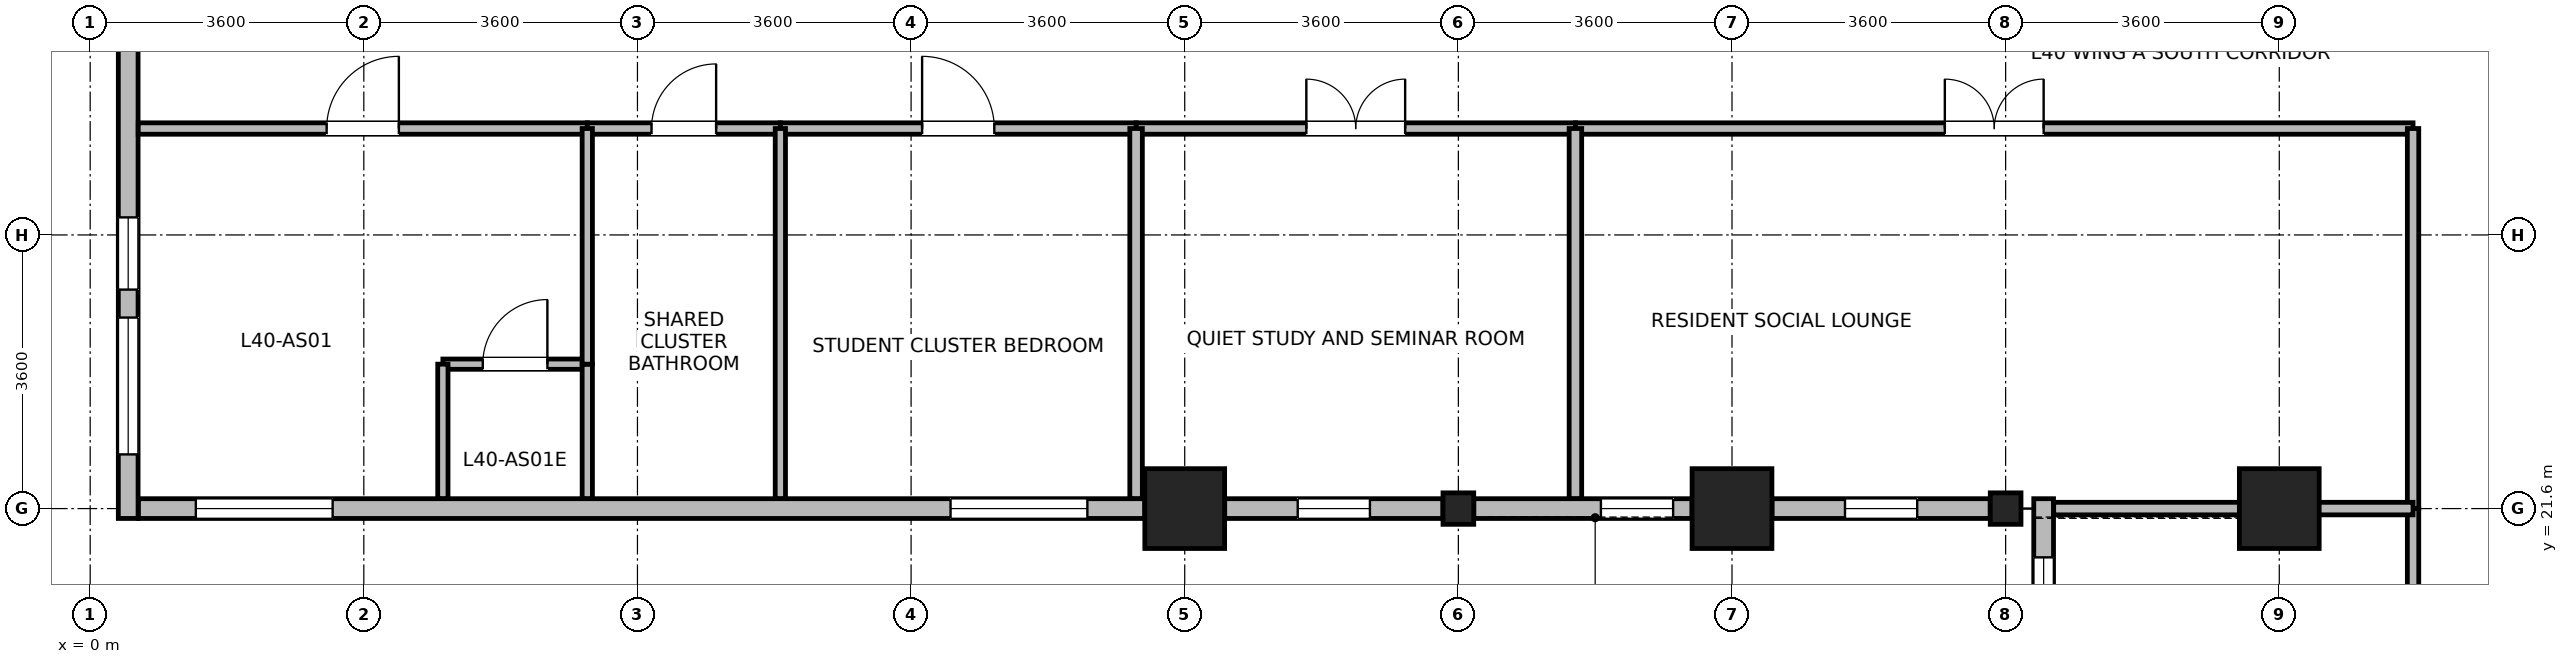
"""IFC4 building model, lengths in metres.
Left out: names, types, materials, properties, quantities, classifications, styles, units other than length and angle.
Written with IfcOpenShell. Run it as: python <this file> out.ifc"""

import sys

from ifc_helpers import new_model, si_unit, direction, frame, frame_2d, origin, origin_2d, place, context, subcontext, project, spatial, rectangle, i_section, extrude, source, transform, mapped, element, fill, save


model = new_model("IFC4")
c1 = context("Model", 3, precision=1e-05, world=origin(), true_north=direction((0.0, 1.0)))
c2 = subcontext(c1, "Body", "Model", "MODEL_VIEW")
j1 = project(units=[si_unit("LENGTHUNIT", "METRE"), si_unit("PLANEANGLEUNIT", "RADIAN")], contexts=[c1])
p1 = place(None, origin())
s1 = spatial("IfcSite", under=j1, at=p1, CompositionType="ELEMENT")
p2 = place(p1, origin())
s2 = spatial("IfcBuilding", under=s1, at=p2, CompositionType="ELEMENT")
p3 = place(p2, frame((0.0, 0.0, 158.7)))
s3 = spatial("IfcBuildingStorey", under=s2, at=p3, CompositionType="ELEMENT", Elevation=158.7)
m1 = source(origin(), c2, "Body", "SweptSolid", [
    extrude(rectangle(XDim=1.05, YDim=1.05, at=origin_2d()), origin(), (0.0, 0.0, 1.0), 3.7),
])
for number, where, z_axis, x_axis in (
    (1, (14.4, 21.6, 0.0), (0.0, 0.0, 1.0), (1.0, 0.0, 0.0)),
    (2, (21.6, 21.6, 0.0), (0.0, 0.0, 1.0), (1.0, 0.0, 0.0)),
    (3, (28.8, 21.6, 0.0), (0.0, 0.0, 1.0), (1.0, 0.0, 0.0)),
):
    element("IfcColumn", number, at=place(p3, frame(where, z_axis=z_axis, x_axis=x_axis)), inside=s3, PredefinedType="COLUMN", context=c2, shape_type="MappedRepresentation", body=[
        mapped(m1, transform((0.0, 0.0, 0.0), x_axis=(1.0, 0.0, 0.0), y_axis=(0.0, 1.0, 0.0), z_axis=(0.0, 0.0, 1.0), scale=1.0)),
    ])
m2 = source(origin(), c2, "Body", "SweptSolid", [
    extrude(i_section(OverallWidth=0.404, OverallDepth=0.414, WebThickness=0.021, FlangeThickness=0.028, FilletRadius=0.015, at=origin_2d()), origin(), (0.0, 0.0, 1.0), 3.7),
])
for number, where, z_axis, x_axis in (
    (4, (18.0, 21.6, 0.0), (0.0, 0.0, 1.0), (1.0, 0.0, 0.0)),
    (5, (25.2, 21.6, 0.0), (0.0, 0.0, 1.0), (1.0, 0.0, 0.0)),
):
    element("IfcColumn", number, at=place(p3, frame(where, z_axis=z_axis, x_axis=x_axis)), inside=s3, PredefinedType="COLUMN", context=c2, shape_type="MappedRepresentation", body=[
        mapped(m2, transform((0.0, 0.0, 0.0), x_axis=(1.0, 0.0, 0.0), y_axis=(0.0, 1.0, 0.0), z_axis=(0.0, 0.0, 1.0), scale=1.0)),
    ])
p4 = place(p3, frame((0.5, 21.47, 0.0), z_axis=(0.0, 0.0, 1.0), x_axis=(0.0, 1.0, 0.0)))
e6 = element("IfcWall", 6, at=p4, inside=s3, PredefinedType="STANDARD", context=c2, shape_type="SweptSolid", body=[
    extrude(rectangle(XDim=6.972, YDim=0.26, at=frame_2d((3.486, 0.0))), origin(), (0.0, 0.0, 1.0), 3.44),
])
p5 = place(p4, frame((0.843, 0.0, 0.85)))
e7 = element("IfcOpeningElement", 7, at=p5, cuts=e6, PredefinedType="OPENING", context=c2, shape_type="SweptSolid", body=[
    extrude(rectangle(XDim=1.8, YDim=1.85, at=frame_2d((0.9, 0.925))), frame((0.0, 0.14, 0.0), z_axis=(0.0, -1.0, 0.0), x_axis=(1.0, 0.0, 0.0)), (0.0, 0.0, 1.0), 0.28),
])
p6 = place(p4, frame((3.011, 0.0, 0.85)))
e8 = element("IfcOpeningElement", 8, at=p6, cuts=e6, PredefinedType="OPENING", context=c2, shape_type="SweptSolid", body=[
    extrude(rectangle(XDim=0.95, YDim=1.75, at=frame_2d((0.475, 0.875))), frame((0.0, 0.14, 0.0), z_axis=(0.0, -1.0, 0.0), x_axis=(1.0, 0.0, 0.0)), (0.0, 0.0, 1.0), 0.28),
])
p7 = place(p3, frame((13.874, 21.6, 0.0), z_axis=(0.0, 0.0, 1.0), x_axis=(-1.0, 0.0, 0.0)))
e9 = element("IfcWall", 9, at=p7, inside=s3, PredefinedType="STANDARD", context=c2, shape_type="SweptSolid", body=[
    extrude(rectangle(XDim=13.239, YDim=0.26, at=frame_2d((6.62, 0.0))), origin(), (0.0, 0.0, 1.0), 3.44),
])
p8 = place(p7, frame((0.755, 0.0, 0.85)))
e10 = element("IfcOpeningElement", 10, at=p8, cuts=e9, PredefinedType="OPENING", context=c2, shape_type="SweptSolid", body=[
    extrude(rectangle(XDim=1.8, YDim=1.85, at=frame_2d((0.9, 0.925))), frame((0.0, 0.14, 0.0), z_axis=(0.0, -1.0, 0.0), x_axis=(1.0, 0.0, 0.0)), (0.0, 0.0, 1.0), 0.28),
])
p9 = place(p7, frame((10.684, 0.0, 0.85)))
e11 = element("IfcOpeningElement", 11, at=p9, cuts=e9, PredefinedType="OPENING", context=c2, shape_type="SweptSolid", body=[
    extrude(rectangle(XDim=1.8, YDim=1.85, at=frame_2d((0.9, 0.925))), frame((0.0, 0.14, 0.0), z_axis=(0.0, -1.0, 0.0), x_axis=(1.0, 0.0, 0.0)), (0.0, 0.0, 1.0), 0.28),
])
p10 = place(p3, frame((17.797, 21.6, 0.0), z_axis=(0.0, 0.0, 1.0), x_axis=(-1.0, 0.0, 0.0)))
e12 = element("IfcWall", 12, at=p10, inside=s3, PredefinedType="STANDARD", context=c2, shape_type="SweptSolid", body=[
    extrude(rectangle(XDim=2.871, YDim=0.26, at=frame_2d((1.436, 0.0))), origin(), (0.0, 0.0, 1.0), 2.99),
])
p11 = place(p10, frame((0.96, 0.0, 0.85)))
e13 = element("IfcOpeningElement", 13, at=p11, cuts=e12, PredefinedType="OPENING", context=c2, shape_type="SweptSolid", body=[
    extrude(rectangle(XDim=0.95, YDim=1.75, at=frame_2d((0.475, 0.875))), frame((0.0, 0.14, 0.0), z_axis=(0.0, -1.0, 0.0), x_axis=(1.0, 0.0, 0.0)), (0.0, 0.0, 1.0), 0.28),
])
p12 = place(p3, frame((21.074, 21.6, 0.0), z_axis=(0.0, 0.0, 1.0), x_axis=(-1.0, 0.0, 0.0)))
e14 = element("IfcWall", 14, at=p12, inside=s3, PredefinedType="STANDARD", context=c2, shape_type="SweptSolid", body=[
    extrude(rectangle(XDim=2.871, YDim=0.26, at=frame_2d((1.436, 0.0))), origin(), (0.0, 0.0, 1.0), 2.99),
])
p13 = place(p12, frame((0.249, 0.0, 0.85)))
e15 = element("IfcOpeningElement", 15, at=p13, cuts=e14, PredefinedType="OPENING", context=c2, shape_type="SweptSolid", body=[
    extrude(rectangle(XDim=0.95, YDim=1.75, at=frame_2d((0.475, 0.875))), frame((0.0, 0.14, 0.0), z_axis=(0.0, -1.0, 0.0), x_axis=(1.0, 0.0, 0.0)), (0.0, 0.0, 1.0), 0.28),
])
p14 = place(p3, frame((24.997, 21.6, 0.0), z_axis=(0.0, 0.0, 1.0), x_axis=(-1.0, 0.0, 0.0)))
e16 = element("IfcWall", 16, at=p14, inside=s3, PredefinedType="STANDARD", context=c2, shape_type="SweptSolid", body=[
    extrude(rectangle(XDim=2.871, YDim=0.26, at=frame_2d((1.436, 0.0))), origin(), (0.0, 0.0, 1.0), 2.99),
])
p15 = place(p14, frame((0.96, 0.0, 0.85)))
e17 = element("IfcOpeningElement", 17, at=p15, cuts=e16, PredefinedType="OPENING", context=c2, shape_type="SweptSolid", body=[
    extrude(rectangle(XDim=0.95, YDim=1.75, at=frame_2d((0.475, 0.875))), frame((0.0, 0.14, 0.0), z_axis=(0.0, -1.0, 0.0), x_axis=(1.0, 0.0, 0.0)), (0.0, 0.0, 1.0), 0.28),
])
p16 = place(p3, frame((25.7, 1.67, 0.0), z_axis=(0.0, 0.0, 1.0), x_axis=(0.0, 1.0, 0.0)))
e18 = element("IfcWall", 18, at=p16, inside=s3, PredefinedType="STANDARD", context=c2, shape_type="SweptSolid", body=[
    extrude(rectangle(XDim=20.06, YDim=0.26, at=frame_2d((10.03, 0.0))), origin(), (0.0, 0.0, 1.0), 3.44),
])
p17 = place(p16, frame((0.772, 0.0, 0.85)))
e19 = element("IfcOpeningElement", 19, at=p17, cuts=e18, PredefinedType="OPENING", context=c2, shape_type="SweptSolid", body=[
    extrude(rectangle(XDim=1.8, YDim=1.85, at=frame_2d((0.9, 0.925))), frame((0.0, 0.14, 0.0), z_axis=(0.0, -1.0, 0.0), x_axis=(1.0, 0.0, 0.0)), (0.0, 0.0, 1.0), 0.28),
])
p18 = place(p16, frame((7.458, 0.0, 0.85)))
e20 = element("IfcOpeningElement", 20, at=p18, cuts=e18, PredefinedType="OPENING", context=c2, shape_type="SweptSolid", body=[
    extrude(rectangle(XDim=1.8, YDim=1.85, at=frame_2d((0.9, 0.925))), frame((0.0, 0.14, 0.0), z_axis=(0.0, -1.0, 0.0), x_axis=(1.0, 0.0, 0.0)), (0.0, 0.0, 1.0), 0.28),
])
p19 = place(p16, frame((14.145, 0.0, 0.85)))
e21 = element("IfcOpeningElement", 21, at=p19, cuts=e18, PredefinedType="OPENING", context=c2, shape_type="SweptSolid", body=[
    extrude(rectangle(XDim=1.8, YDim=1.85, at=frame_2d((0.9, 0.925))), frame((0.0, 0.14, 0.0), z_axis=(0.0, -1.0, 0.0), x_axis=(1.0, 0.0, 0.0)), (0.0, 0.0, 1.0), 0.28),
])
p20 = place(p16, frame((17.488, 0.0, 0.85)))
e22 = element("IfcOpeningElement", 22, at=p20, cuts=e18, PredefinedType="OPENING", context=c2, shape_type="SweptSolid", body=[
    extrude(rectangle(XDim=1.8, YDim=1.85, at=frame_2d((0.9, 0.925))), frame((0.0, 0.14, 0.0), z_axis=(0.0, -1.0, 0.0), x_axis=(1.0, 0.0, 0.0)), (0.0, 0.0, 1.0), 0.28),
])
p21 = place(p3, frame((4.64, 23.5, 0.0), z_axis=(0.0, 0.0, 1.0), x_axis=(1.0, 0.0, 0.0)))
e23 = element("IfcWall", 23, at=p21, inside=s3, PredefinedType="PARTITIONING", context=c2, shape_type="SweptSolid", body=[
    extrude(rectangle(XDim=1.9, YDim=0.135, at=frame_2d((0.95, 0.0))), origin(), (0.0, 0.0, 1.0), 3.44),
])
p22 = place(p21, frame((0.525, 0.0, 0.0)))
e24 = element("IfcOpeningElement", 24, at=p22, cuts=e23, PredefinedType="OPENING", context=c2, shape_type="SweptSolid", body=[
    extrude(rectangle(XDim=0.85, YDim=2.04, at=frame_2d((0.425, 1.02))), frame((0.0, 0.078, 0.0), z_axis=(0.0, -1.0, 0.0), x_axis=(1.0, 0.0, 0.0)), (0.0, 0.0, 1.0), 0.155),
])
for number, where, z_axis, x_axis in (
    (25, (4.64, 21.732, 0.0), (0.0, 0.0, 1.0), (0.0, 1.0, 0.0)),
    (26, (6.54, 21.732, 0.0), (0.0, 0.0, 1.0), (0.0, 1.0, 0.0)),
):
    element("IfcWall", number, at=place(p3, frame(where, z_axis=z_axis, x_axis=x_axis)), inside=s3, PredefinedType="PARTITIONING", context=c2, shape_type="SweptSolid", body=[
        extrude(rectangle(XDim=1.768, YDim=0.135, at=frame_2d((0.884, 0.0))), origin(), (0.0, 0.0, 1.0), 3.44),
    ])
p23 = place(p3, frame((19.54, 26.6, 0.0), z_axis=(0.0, 0.0, 1.0), x_axis=(1.0, 0.0, 0.0)))
e27 = element("IfcWall", 27, at=p23, inside=s3, PredefinedType="PARTITIONING", context=c2, shape_type="SweptSolid", body=[
    extrude(rectangle(XDim=11.02, YDim=0.15, at=frame_2d((5.51, 0.0))), origin(), (0.0, 0.0, 1.0), 3.44),
])
p24 = place(p23, frame((4.86, 0.0, 0.0)))
e28 = element("IfcOpeningElement", 28, at=p24, cuts=e27, PredefinedType="OPENING", context=c2, shape_type="SweptSolid", body=[
    extrude(rectangle(XDim=1.3, YDim=2.12, at=frame_2d((0.65, 1.06))), frame((0.0, 0.085, 0.0), z_axis=(0.0, -1.0, 0.0), x_axis=(1.0, 0.0, 0.0)), (0.0, 0.0, 1.0), 0.17),
])
p25 = place(p3, frame((30.56, 14.5, 0.0), z_axis=(0.0, 0.0, 1.0), x_axis=(0.0, 1.0, 0.0)))
e29 = element("IfcWall", 29, at=p25, inside=s3, PredefinedType="PARTITIONING", context=c2, shape_type="SweptSolid", body=[
    extrude(rectangle(XDim=7.1, YDim=0.15, at=frame_2d((3.55, 0.0))), origin(), (0.0, 0.0, 1.0), 3.44),
])
p26 = place(p25, frame((2.9, 0.0, 0.0)))
e30 = element("IfcOpeningElement", 30, at=p26, cuts=e29, PredefinedType="OPENING", context=c2, shape_type="SweptSolid", body=[
    extrude(rectangle(XDim=1.3, YDim=2.12, at=frame_2d((0.65, 1.06))), frame((0.0, 0.085, 0.0), z_axis=(0.0, -1.0, 0.0), x_axis=(1.0, 0.0, 0.0)), (0.0, 0.0, 1.0), 0.17),
])
p27 = place(p3, frame((0.632, 26.6, 0.0), z_axis=(0.0, 0.0, 1.0), x_axis=(1.0, 0.0, 0.0)))
e31 = element("IfcWall", 31, at=p27, inside=s3, PredefinedType="PARTITIONING", context=c2, shape_type="SweptSolid", body=[
    extrude(rectangle(XDim=5.908, YDim=0.15, at=frame_2d((2.954, 0.0))), origin(), (0.0, 0.0, 1.0), 3.44),
])
p28 = place(p27, frame((2.479, 0.0, 0.0)))
e32 = element("IfcOpeningElement", 32, at=p28, cuts=e31, PredefinedType="OPENING", context=c2, shape_type="SweptSolid", body=[
    extrude(rectangle(XDim=0.95, YDim=2.1, at=frame_2d((0.475, 1.05))), frame((0.0, 0.085, 0.0), z_axis=(0.0, -1.0, 0.0), x_axis=(1.0, 0.0, 0.0)), (0.0, 0.0, 1.0), 0.17),
])
p29 = place(p3, frame((13.76, 26.6, 0.0), z_axis=(0.0, 0.0, 1.0), x_axis=(1.0, 0.0, 0.0)))
e33 = element("IfcWall", 33, at=p29, inside=s3, PredefinedType="PARTITIONING", context=c2, shape_type="SweptSolid", body=[
    extrude(rectangle(XDim=5.78, YDim=0.15, at=frame_2d((2.89, 0.0))), origin(), (0.0, 0.0, 1.0), 3.44),
])
p30 = place(p29, frame((2.24, 0.0, 0.0)))
e34 = element("IfcOpeningElement", 34, at=p30, cuts=e33, PredefinedType="OPENING", context=c2, shape_type="SweptSolid", body=[
    extrude(rectangle(XDim=1.3, YDim=2.12, at=frame_2d((0.65, 1.06))), frame((0.0, 0.085, 0.0), z_axis=(0.0, -1.0, 0.0), x_axis=(1.0, 0.0, 0.0)), (0.0, 0.0, 1.0), 0.17),
])
p31 = place(p3, frame((30.56, 21.6, 0.0), z_axis=(0.0, 0.0, 1.0), x_axis=(0.0, 1.0, 0.0)))
e35 = element("IfcWall", 35, at=p31, inside=s3, PredefinedType="PARTITIONING", context=c2, shape_type="SweptSolid", body=[
    extrude(rectangle(XDim=5.0, YDim=0.15, at=frame_2d((2.5, 0.0))), origin(), (0.0, 0.0, 1.0), 3.44),
])
p32 = place(p3, frame((9.08, 26.6, 0.0), z_axis=(0.0, 0.0, 1.0), x_axis=(1.0, 0.0, 0.0)))
e36 = element("IfcWall", 36, at=p32, inside=s3, PredefinedType="PARTITIONING", context=c2, shape_type="SweptSolid", body=[
    extrude(rectangle(XDim=4.68, YDim=0.15, at=frame_2d((2.34, 0.0))), origin(), (0.0, 0.0, 1.0), 3.44),
])
p33 = place(p32, frame((1.865, 0.0, 0.0)))
e37 = element("IfcOpeningElement", 37, at=p33, cuts=e36, PredefinedType="OPENING", context=c2, shape_type="SweptSolid", body=[
    extrude(rectangle(XDim=0.95, YDim=2.1, at=frame_2d((0.475, 1.05))), frame((0.0, 0.085, 0.0), z_axis=(0.0, -1.0, 0.0), x_axis=(1.0, 0.0, 0.0)), (0.0, 0.0, 1.0), 0.17),
])
p34 = place(p3, frame((6.54, 26.6, 0.0), z_axis=(0.0, 0.0, 1.0), x_axis=(1.0, 0.0, 0.0)))
e38 = element("IfcWall", 38, at=p34, inside=s3, PredefinedType="PARTITIONING", context=c2, shape_type="SweptSolid", body=[
    extrude(rectangle(XDim=2.54, YDim=0.15, at=frame_2d((1.27, 0.0))), origin(), (0.0, 0.0, 1.0), 3.44),
])
p35 = place(p34, frame((0.845, 0.0, 0.0)))
e39 = element("IfcOpeningElement", 39, at=p35, cuts=e38, PredefinedType="OPENING", context=c2, shape_type="SweptSolid", body=[
    extrude(rectangle(XDim=0.85, YDim=2.04, at=frame_2d((0.425, 1.02))), frame((0.0, 0.085, 0.0), z_axis=(0.0, -1.0, 0.0), x_axis=(1.0, 0.0, 0.0)), (0.0, 0.0, 1.0), 0.17),
])
p36 = place(p3, frame((9.08, 21.732, 0.0), z_axis=(0.0, 0.0, 1.0), x_axis=(0.0, 1.0, 0.0)))
e40 = element("IfcWall", 40, at=p36, inside=s3, PredefinedType="PARTITIONING", context=c2, shape_type="SweptSolid", body=[
    extrude(rectangle(XDim=4.868, YDim=0.135, at=frame_2d((2.434, 0.0))), origin(), (0.0, 0.0, 1.0), 3.44),
])
for number, where, z_axis, x_axis in (
    (41, (13.76, 21.732, 0.0), (0.0, 0.0, 1.0), (0.0, 1.0, 0.0)),
    (42, (19.54, 21.732, 0.0), (0.0, 0.0, 1.0), (0.0, 1.0, 0.0)),
):
    element("IfcWall", number, at=place(p3, frame(where, z_axis=z_axis, x_axis=x_axis)), inside=s3, PredefinedType="PARTITIONING", context=c2, shape_type="SweptSolid", body=[
        extrude(rectangle(XDim=4.868, YDim=0.165, at=frame_2d((2.434, 0.0))), origin(), (0.0, 0.0, 1.0), 3.44),
    ])
p37 = place(p3, frame((25.832, 21.6, 0.0), z_axis=(0.0, 0.0, 1.0), x_axis=(1.0, 0.0, 0.0)))
e43 = element("IfcWall", 43, at=p37, inside=s3, PredefinedType="PARTITIONING", context=c2, shape_type="SweptSolid", body=[
    extrude(rectangle(XDim=4.728, YDim=0.165, at=frame_2d((2.364, 0.0))), origin(), (0.0, 0.0, 1.0), 2.99),
])
p38 = place(p3, frame((6.54, 23.5, 0.0), z_axis=(0.0, 0.0, 1.0), x_axis=(0.0, 1.0, 0.0)))
e44 = element("IfcWall", 44, at=p38, inside=s3, PredefinedType="PARTITIONING", context=c2, shape_type="SweptSolid", body=[
    extrude(rectangle(XDim=3.1, YDim=0.135, at=frame_2d((1.55, 0.0))), origin(), (0.0, 0.0, 1.0), 3.44),
])
p39 = place(p5, origin())
e45 = element("IfcWindow", 45, at=p39, inside=s3, PartitioningType="SINGLE_PANEL", PredefinedType="WINDOW", context=c2, shape_type="SweptSolid", body=[
    extrude(rectangle(XDim=1.8, YDim=1.85, at=frame_2d((0.9, 0.925))), frame((0.0, 0.03, 0.0), z_axis=(0.0, -1.0, 0.0), x_axis=(1.0, 0.0, 0.0)), (0.0, 0.0, 1.0), 0.06),
])
fill(e7, e45)
p40 = place(p6, origin())
e46 = element("IfcWindow", 46, at=p40, inside=s3, PartitioningType="SINGLE_PANEL", PredefinedType="WINDOW", context=c2, shape_type="SweptSolid", body=[
    extrude(rectangle(XDim=0.95, YDim=1.75, at=frame_2d((0.475, 0.875))), frame((0.0, 0.03, 0.0), z_axis=(0.0, -1.0, 0.0), x_axis=(1.0, 0.0, 0.0)), (0.0, 0.0, 1.0), 0.06),
])
fill(e8, e46)
p41 = place(p8, origin())
e47 = element("IfcWindow", 47, at=p41, inside=s3, PartitioningType="SINGLE_PANEL", PredefinedType="WINDOW", context=c2, shape_type="SweptSolid", body=[
    extrude(rectangle(XDim=1.8, YDim=1.85, at=frame_2d((0.9, 0.925))), frame((0.0, 0.03, 0.0), z_axis=(0.0, -1.0, 0.0), x_axis=(1.0, 0.0, 0.0)), (0.0, 0.0, 1.0), 0.06),
])
fill(e10, e47)
p42 = place(p9, origin())
e48 = element("IfcWindow", 48, at=p42, inside=s3, PartitioningType="SINGLE_PANEL", PredefinedType="WINDOW", context=c2, shape_type="SweptSolid", body=[
    extrude(rectangle(XDim=1.8, YDim=1.85, at=frame_2d((0.9, 0.925))), frame((0.0, 0.03, 0.0), z_axis=(0.0, -1.0, 0.0), x_axis=(1.0, 0.0, 0.0)), (0.0, 0.0, 1.0), 0.06),
])
fill(e11, e48)
p43 = place(p11, origin())
e49 = element("IfcWindow", 49, at=p43, inside=s3, PartitioningType="SINGLE_PANEL", PredefinedType="WINDOW", context=c2, shape_type="SweptSolid", body=[
    extrude(rectangle(XDim=0.95, YDim=1.75, at=frame_2d((0.475, 0.875))), frame((0.0, 0.03, 0.0), z_axis=(0.0, -1.0, 0.0), x_axis=(1.0, 0.0, 0.0)), (0.0, 0.0, 1.0), 0.06),
])
fill(e13, e49)
p44 = place(p13, origin())
e50 = element("IfcWindow", 50, at=p44, inside=s3, PartitioningType="SINGLE_PANEL", PredefinedType="WINDOW", context=c2, shape_type="SweptSolid", body=[
    extrude(rectangle(XDim=0.95, YDim=1.75, at=frame_2d((0.475, 0.875))), frame((0.0, 0.03, 0.0), z_axis=(0.0, -1.0, 0.0), x_axis=(1.0, 0.0, 0.0)), (0.0, 0.0, 1.0), 0.06),
])
fill(e15, e50)
p45 = place(p15, origin())
e51 = element("IfcWindow", 51, at=p45, inside=s3, PartitioningType="SINGLE_PANEL", PredefinedType="WINDOW", context=c2, shape_type="SweptSolid", body=[
    extrude(rectangle(XDim=0.95, YDim=1.75, at=frame_2d((0.475, 0.875))), frame((0.0, 0.03, 0.0), z_axis=(0.0, -1.0, 0.0), x_axis=(1.0, 0.0, 0.0)), (0.0, 0.0, 1.0), 0.06),
])
fill(e17, e51)
p46 = place(p20, origin())
e52 = element("IfcWindow", 52, at=p46, inside=s3, PartitioningType="SINGLE_PANEL", PredefinedType="WINDOW", context=c2, shape_type="SweptSolid", body=[
    extrude(rectangle(XDim=1.8, YDim=1.85, at=frame_2d((0.9, 0.925))), frame((0.0, 0.03, 0.0), z_axis=(0.0, -1.0, 0.0), x_axis=(1.0, 0.0, 0.0)), (0.0, 0.0, 1.0), 0.06),
])
fill(e22, e52)
p47 = place(p22, origin())
e53 = element("IfcDoor", 53, at=p47, inside=s3, OperationType="SINGLE_SWING_RIGHT", PredefinedType="DOOR", context=c2, shape_type="SweptSolid", body=[
    extrude(rectangle(XDim=0.85, YDim=2.04, at=frame_2d((0.425, 1.02))), frame((0.0, 0.025, 0.0), z_axis=(0.0, -1.0, 0.0), x_axis=(1.0, 0.0, 0.0)), (0.0, 0.0, 1.0), 0.05),
])
fill(e24, e53)
p48 = place(p24, origin())
e54 = element("IfcDoor", 54, at=p48, inside=s3, OperationType="DOUBLE_DOOR_SINGLE_SWING", PredefinedType="DOOR", context=c2, shape_type="SweptSolid", body=[
    extrude(rectangle(XDim=1.3, YDim=2.12, at=frame_2d((0.65, 1.06))), frame((0.0, 0.025, 0.0), z_axis=(0.0, -1.0, 0.0), x_axis=(1.0, 0.0, 0.0)), (0.0, 0.0, 1.0), 0.05),
])
fill(e28, e54)
p49 = place(p28, origin())
e55 = element("IfcDoor", 55, at=p49, inside=s3, OperationType="SINGLE_SWING_RIGHT", PredefinedType="DOOR", context=c2, shape_type="SweptSolid", body=[
    extrude(rectangle(XDim=0.95, YDim=2.1, at=frame_2d((0.475, 1.05))), frame((0.0, 0.025, 0.0), z_axis=(0.0, -1.0, 0.0), x_axis=(1.0, 0.0, 0.0)), (0.0, 0.0, 1.0), 0.05),
])
fill(e32, e55)
p50 = place(p30, origin())
e56 = element("IfcDoor", 56, at=p50, inside=s3, OperationType="DOUBLE_DOOR_SINGLE_SWING", PredefinedType="DOOR", context=c2, shape_type="SweptSolid", body=[
    extrude(rectangle(XDim=1.3, YDim=2.12, at=frame_2d((0.65, 1.06))), frame((0.0, 0.025, 0.0), z_axis=(0.0, -1.0, 0.0), x_axis=(1.0, 0.0, 0.0)), (0.0, 0.0, 1.0), 0.05),
])
fill(e34, e56)
p51 = place(p33, origin())
e57 = element("IfcDoor", 57, at=p51, inside=s3, OperationType="SINGLE_SWING_LEFT", PredefinedType="DOOR", context=c2, shape_type="SweptSolid", body=[
    extrude(rectangle(XDim=0.95, YDim=2.1, at=frame_2d((0.475, 1.05))), frame((0.0, 0.025, 0.0), z_axis=(0.0, -1.0, 0.0), x_axis=(1.0, 0.0, 0.0)), (0.0, 0.0, 1.0), 0.05),
])
fill(e37, e57)
p52 = place(p35, origin())
e58 = element("IfcDoor", 58, at=p52, inside=s3, OperationType="SINGLE_SWING_RIGHT", PredefinedType="DOOR", context=c2, shape_type="SweptSolid", body=[
    extrude(rectangle(XDim=0.85, YDim=2.04, at=frame_2d((0.425, 1.02))), frame((0.0, 0.025, 0.0), z_axis=(0.0, -1.0, 0.0), x_axis=(1.0, 0.0, 0.0)), (0.0, 0.0, 1.0), 0.05),
])
fill(e39, e58)
save(model, sys.argv[1])
